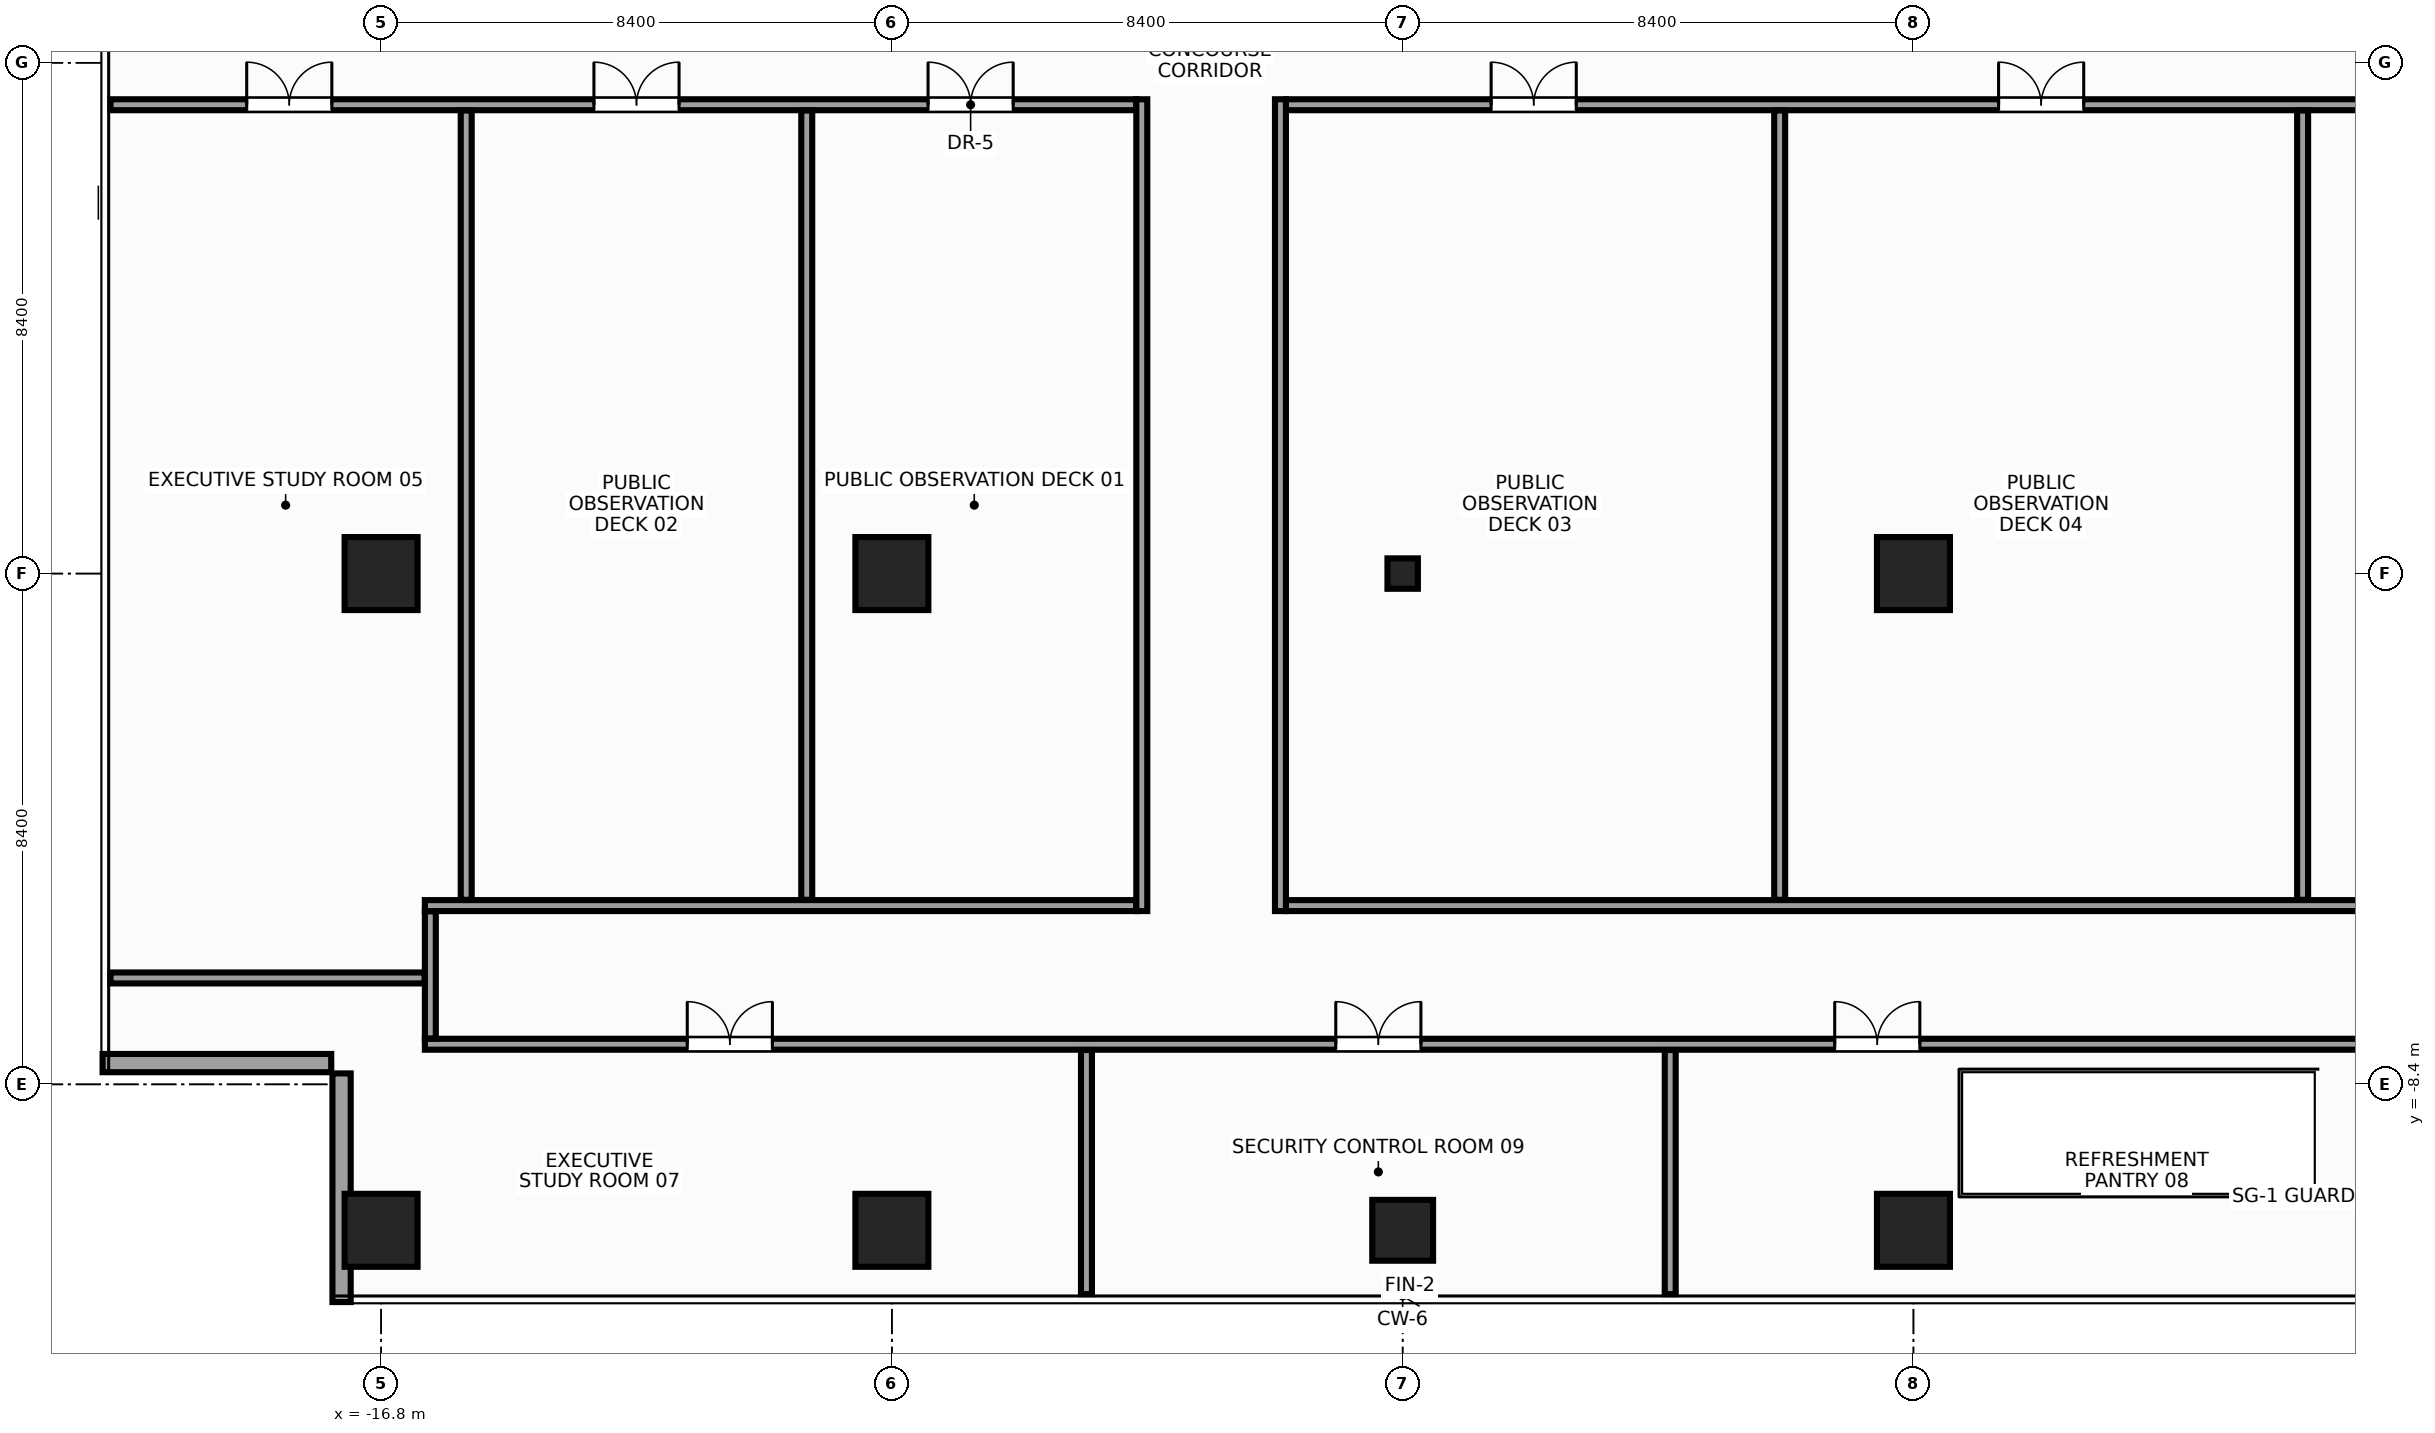
"""IFC4 building model, lengths in metres.
Left out: names, types, materials, properties, quantities, classifications, styles, units other than length and angle.
Written with IfcOpenShell. Run it as: python <this file> out.ifc"""

import sys

from ifc_helpers import new_model, si_unit, direction, frame, frame_2d, origin, origin_with_axes, origin_2d, place, context, subcontext, project, spatial, rectangle, hollow_rectangle, extrude, source, transform, mapped, element, fill, save


model = new_model("IFC4")
c1 = context("Model", 3, precision=1e-05, world=origin(), true_north=direction((0.0, 1.0)))
c2 = subcontext(c1, "Body", "Model", "MODEL_VIEW")
j1 = project(units=[si_unit("LENGTHUNIT", "METRE"), si_unit("PLANEANGLEUNIT", "RADIAN")], contexts=[c1])
p1 = place(None, origin())
s1 = spatial("IfcSite", under=j1, at=p1, CompositionType="ELEMENT")
p2 = place(p1, origin())
s2 = spatial("IfcBuilding", under=s1, at=p2, CompositionType="ELEMENT")
p3 = place(p2, frame((0.0, 0.0, 290.0)))
s3 = spatial("IfcBuildingStorey", under=s2, at=p3, CompositionType="ELEMENT", Elevation=290.0)
m1 = source(origin(), c2, "Body", "SweptSolid", [
    extrude(rectangle(XDim=1.2, YDim=1.2, at=origin_2d()), origin(), (0.0, 0.0, 1.0), 3.6),
])
for number, where, z_axis, x_axis in (
    (1, (-16.8, -10.8, 0.0), (0.0, 0.0, 1.0), (1.0, 0.0, 0.0)),
    (2, (-16.8, 0.0, 0.0), (0.0, 0.0, 1.0), (1.0, 0.0, 0.0)),
    (3, (-8.4, 0.0, 0.0), (0.0, 0.0, 1.0), (1.0, 0.0, 0.0)),
    (4, (-8.4, -10.8, 0.0), (0.0, 0.0, 1.0), (1.0, 0.0, 0.0)),
    (5, (8.4, 0.0, 0.0), (0.0, 0.0, 1.0), (1.0, 0.0, 0.0)),
    (6, (8.4, -10.8, 0.0), (0.0, 0.0, 1.0), (1.0, 0.0, 0.0)),
):
    element("IfcColumn", number, at=place(p3, frame(where, z_axis=z_axis, x_axis=x_axis)), inside=s3, PredefinedType="COLUMN", context=c2, shape_type="MappedRepresentation", body=[
        mapped(m1, transform((0.0, 0.0, 0.0), x_axis=(1.0, 0.0, 0.0), y_axis=(0.0, 1.0, 0.0), z_axis=(0.0, 0.0, 1.0), scale=1.0)),
    ])
m2 = source(origin(), c2, "Body", "SweptSolid", [
    extrude(rectangle(XDim=1.0, YDim=1.0, at=origin_2d()), origin(), (0.0, 0.0, 1.0), 3.6),
])
p4 = place(p3, frame((0.0, -10.8, 0.0), z_axis=(0.0, 0.0, 1.0), x_axis=(1.0, 0.0, 0.0)))
e7 = element("IfcColumn", 7, at=p4, inside=s3, PredefinedType="COLUMN", context=c2, shape_type="MappedRepresentation", body=[
    mapped(m2, transform((0.0, 0.0, 0.0), x_axis=(1.0, 0.0, 0.0), y_axis=(0.0, 1.0, 0.0), z_axis=(0.0, 0.0, 1.0), scale=1.0)),
])
m3 = source(origin(), c2, "Body", "SweptSolid", [
    extrude(hollow_rectangle(XDim=0.5, YDim=0.5, WallThickness=0.025, at=origin_2d()), origin(), (0.0, 0.0, 1.0), 3.6),
])
p5 = place(p3, origin_with_axes())
e8 = element("IfcColumn", 8, at=p5, inside=s3, PredefinedType="COLUMN", context=c2, shape_type="MappedRepresentation", body=[
    mapped(m3, transform((0.0, 0.0, 0.0), x_axis=(1.0, 0.0, 0.0), y_axis=(0.0, 1.0, 0.0), z_axis=(0.0, 0.0, 1.0), scale=1.0)),
])
m4 = source(origin(), c2, "Body", "SweptSolid", [
    extrude(rectangle(XDim=3.76, YDim=0.3, at=frame_2d((1.88, 0.0))), origin(), (0.0, 0.0, 1.0), 3.6),
])
p6 = place(p3, frame((-21.38, -8.05, 0.0), z_axis=(0.0, 0.0, 1.0), x_axis=(1.0, 0.0, 0.0)))
e9 = element("IfcWall", 9, at=p6, inside=s3, PredefinedType="STANDARD", context=c2, shape_type="MappedRepresentation", body=[
    mapped(m4, transform((0.0, 0.0, 0.0), x_axis=(1.0, 0.0, 0.0), y_axis=(0.0, 1.0, 0.0), z_axis=(0.0, 0.0, 1.0), scale=1.0)),
])
m5 = source(origin(), c2, "Body", "SweptSolid", [
    extrude(rectangle(XDim=3.76, YDim=0.3, at=frame_2d((1.88, 0.0))), origin(), (0.0, 0.0, 1.0), 3.6),
])
p7 = place(p3, frame((-17.45, -8.22, 0.0), z_axis=(0.0, 0.0, 1.0), x_axis=(0.0, -1.0, 0.0)))
e10 = element("IfcWall", 10, at=p7, inside=s3, PredefinedType="STANDARD", context=c2, shape_type="MappedRepresentation", body=[
    mapped(m5, transform((0.0, 0.0, 0.0), x_axis=(1.0, 0.0, 0.0), y_axis=(0.0, 1.0, 0.0), z_axis=(0.0, 0.0, 1.0), scale=1.0)),
])
m6 = source(origin(), c2, "Body", "SweptSolid", [
    extrude(rectangle(XDim=16.87, YDim=0.18, at=frame_2d((8.435, 0.0))), origin(), (0.0, 0.0, 1.0), 2.685),
])
p8 = place(p3, frame((-21.25, 7.71, 0.0), z_axis=(0.0, 0.0, 1.0), x_axis=(1.0, 0.0, 0.0)))
e11 = element("IfcWall", 11, at=p8, inside=s3, PredefinedType="PARTITIONING", context=c2, shape_type="MappedRepresentation", body=[
    mapped(m6, transform((0.0, 0.0, 0.0), x_axis=(1.0, 0.0, 0.0), y_axis=(0.0, 1.0, 0.0), z_axis=(0.0, 0.0, 1.0), scale=1.0)),
])
p9 = place(p8, frame((13.445, 0.0, 0.0)))
e12 = element("IfcOpeningElement", 12, at=p9, cuts=e11, PredefinedType="OPENING", context=c2, shape_type="SweptSolid", body=[
    extrude(rectangle(XDim=1.4, YDim=2.2, at=frame_2d((0.7, 1.1))), frame((0.0, 0.102, 0.0), z_axis=(0.0, -1.0, 0.0), x_axis=(1.0, 0.0, 0.0)), (0.0, 0.0, 1.0), 0.204),
])
p10 = place(p8, frame((7.95, 0.0, 0.0)))
e13 = element("IfcOpeningElement", 13, at=p10, cuts=e11, PredefinedType="OPENING", context=c2, shape_type="SweptSolid", body=[
    extrude(rectangle(XDim=1.4, YDim=2.2, at=frame_2d((0.7, 1.1))), frame((0.0, 0.102, 0.0), z_axis=(0.0, -1.0, 0.0), x_axis=(1.0, 0.0, 0.0)), (0.0, 0.0, 1.0), 0.204),
])
p11 = place(p8, frame((2.24, 0.0, 0.0)))
e14 = element("IfcOpeningElement", 14, at=p11, cuts=e11, PredefinedType="OPENING", context=c2, shape_type="SweptSolid", body=[
    extrude(rectangle(XDim=1.4, YDim=2.2, at=frame_2d((0.7, 1.1))), frame((0.0, 0.102, 0.0), z_axis=(0.0, -1.0, 0.0), x_axis=(1.0, 0.0, 0.0)), (0.0, 0.0, 1.0), 0.204),
])
m7 = source(origin(), c2, "Body", "SweptSolid", [
    extrude(rectangle(XDim=23.17, YDim=0.18, at=frame_2d((11.585, 0.0))), origin(), (0.0, 0.0, 1.0), 2.685),
])
p12 = place(p3, frame((-1.92, 7.71, 0.0), z_axis=(0.0, 0.0, 1.0), x_axis=(1.0, 0.0, 0.0)))
e15 = element("IfcWall", 15, at=p12, inside=s3, PredefinedType="PARTITIONING", context=c2, shape_type="MappedRepresentation", body=[
    mapped(m7, transform((0.0, 0.0, 0.0), x_axis=(1.0, 0.0, 0.0), y_axis=(0.0, 1.0, 0.0), z_axis=(0.0, 0.0, 1.0), scale=1.0)),
])
p13 = place(p12, frame((3.375, 0.0, 0.0)))
e16 = element("IfcOpeningElement", 16, at=p13, cuts=e15, PredefinedType="OPENING", context=c2, shape_type="SweptSolid", body=[
    extrude(rectangle(XDim=1.4, YDim=2.2, at=frame_2d((0.7, 1.1))), frame((0.0, 0.102, 0.0), z_axis=(0.0, -1.0, 0.0), x_axis=(1.0, 0.0, 0.0)), (0.0, 0.0, 1.0), 0.204),
])
p14 = place(p12, frame((11.72, 0.0, 0.0)))
e17 = element("IfcOpeningElement", 17, at=p14, cuts=e15, PredefinedType="OPENING", context=c2, shape_type="SweptSolid", body=[
    extrude(rectangle(XDim=1.4, YDim=2.2, at=frame_2d((0.7, 1.1))), frame((0.0, 0.102, 0.0), z_axis=(0.0, -1.0, 0.0), x_axis=(1.0, 0.0, 0.0)), (0.0, 0.0, 1.0), 0.204),
])
p15 = place(p12, frame((19.23, 0.0, 0.0)))
e18 = element("IfcOpeningElement", 18, at=p15, cuts=e15, PredefinedType="OPENING", context=c2, shape_type="SweptSolid", body=[
    extrude(rectangle(XDim=1.4, YDim=2.2, at=frame_2d((0.7, 1.1))), frame((0.0, 0.102, 0.0), z_axis=(0.0, -1.0, 0.0), x_axis=(1.0, 0.0, 0.0)), (0.0, 0.0, 1.0), 0.204),
])
m8 = source(origin(), c2, "Body", "SweptSolid", [
    extrude(rectangle(XDim=11.7, YDim=0.18, at=frame_2d((5.85, 0.0))), origin(), (0.0, 0.0, 1.0), 2.685),
])
p16 = place(p3, frame((-16.08, -5.46, 0.0), z_axis=(0.0, 0.0, 1.0), x_axis=(1.0, 0.0, 0.0)))
e19 = element("IfcWall", 19, at=p16, inside=s3, PredefinedType="PARTITIONING", context=c2, shape_type="MappedRepresentation", body=[
    mapped(m8, transform((0.0, 0.0, 0.0), x_axis=(1.0, 0.0, 0.0), y_axis=(0.0, 1.0, 0.0), z_axis=(0.0, 0.0, 1.0), scale=1.0)),
])
m9 = source(origin(), c2, "Body", "SweptSolid", [
    extrude(rectangle(XDim=18.0, YDim=0.18, at=frame_2d((9.0, 0.0))), origin(), (0.0, 0.0, 1.0), 2.685),
])
p17 = place(p3, frame((-1.92, -5.46, 0.0), z_axis=(0.0, 0.0, 1.0), x_axis=(1.0, 0.0, 0.0)))
e20 = element("IfcWall", 20, at=p17, inside=s3, PredefinedType="PARTITIONING", context=c2, shape_type="MappedRepresentation", body=[
    mapped(m9, transform((0.0, 0.0, 0.0), x_axis=(1.0, 0.0, 0.0), y_axis=(0.0, 1.0, 0.0), z_axis=(0.0, 0.0, 1.0), scale=1.0)),
])
m10 = source(origin(), c2, "Body", "SweptSolid", [
    extrude(rectangle(XDim=32.16, YDim=0.18, at=frame_2d((16.08, 0.0))), origin(), (0.0, 0.0, 1.0), 2.685),
])
p18 = place(p3, frame((-16.08, -7.74, 0.0), z_axis=(0.0, 0.0, 1.0), x_axis=(1.0, 0.0, 0.0)))
e21 = element("IfcWall", 21, at=p18, inside=s3, PredefinedType="PARTITIONING", context=c2, shape_type="MappedRepresentation", body=[
    mapped(m10, transform((0.0, 0.0, 0.0), x_axis=(1.0, 0.0, 0.0), y_axis=(0.0, 1.0, 0.0), z_axis=(0.0, 0.0, 1.0), scale=1.0)),
])
p19 = place(p18, frame((4.315, 0.0, 0.0)))
e22 = element("IfcOpeningElement", 22, at=p19, cuts=e21, PredefinedType="OPENING", context=c2, shape_type="SweptSolid", body=[
    extrude(rectangle(XDim=1.4, YDim=2.2, at=frame_2d((0.7, 1.1))), frame((0.0, 0.102, 0.0), z_axis=(0.0, -1.0, 0.0), x_axis=(1.0, 0.0, 0.0)), (0.0, 0.0, 1.0), 0.204),
])
p20 = place(p18, frame((23.185, 0.0, 0.0)))
e23 = element("IfcOpeningElement", 23, at=p20, cuts=e21, PredefinedType="OPENING", context=c2, shape_type="SweptSolid", body=[
    extrude(rectangle(XDim=1.4, YDim=2.2, at=frame_2d((0.7, 1.1))), frame((0.0, 0.102, 0.0), z_axis=(0.0, -1.0, 0.0), x_axis=(1.0, 0.0, 0.0)), (0.0, 0.0, 1.0), 0.204),
])
p21 = place(p18, frame((14.98, 0.0, 0.0)))
e24 = element("IfcOpeningElement", 24, at=p21, cuts=e21, PredefinedType="OPENING", context=c2, shape_type="SweptSolid", body=[
    extrude(rectangle(XDim=1.4, YDim=2.2, at=frame_2d((0.7, 1.1))), frame((0.0, 0.102, 0.0), z_axis=(0.0, -1.0, 0.0), x_axis=(1.0, 0.0, 0.0)), (0.0, 0.0, 1.0), 0.204),
])
m11 = source(origin(), c2, "Body", "SweptSolid", [
    extrude(rectangle(XDim=13.35, YDim=0.18, at=frame_2d((6.675, 0.0))), origin(), (0.0, 0.0, 1.0), 2.585),
])
for number, where, z_axis, x_axis in (
    (25, (-4.29, -5.55, 0.0), (0.0, 0.0, 1.0), (0.0, 1.0, 0.0)),
    (26, (-2.01, -5.55, 0.0), (0.0, 0.0, 1.0), (0.0, 1.0, 0.0)),
):
    element("IfcWall", number, at=place(p3, frame(where, z_axis=z_axis, x_axis=x_axis)), inside=s3, PredefinedType="PARTITIONING", context=c2, shape_type="MappedRepresentation", body=[
        mapped(m11, transform((0.0, 0.0, 0.0), x_axis=(1.0, 0.0, 0.0), y_axis=(0.0, 1.0, 0.0), z_axis=(0.0, 0.0, 1.0), scale=1.0)),
    ])
m12 = source(origin(), c2, "Body", "SweptSolid", [
    extrude(rectangle(XDim=2.09, YDim=0.18, at=frame_2d((1.045, 0.0))), origin(), (0.0, 0.0, 1.0), 3.3),
])
p22 = place(p3, frame((-15.99, -7.645, 0.0), z_axis=(0.0, 0.0, 1.0), x_axis=(0.0, 1.0, 0.0)))
e27 = element("IfcWall", 27, at=p22, inside=s3, PredefinedType="PARTITIONING", context=c2, shape_type="MappedRepresentation", body=[
    mapped(m12, transform((0.0, 0.0, 0.0), x_axis=(1.0, 0.0, 0.0), y_axis=(0.0, 1.0, 0.0), z_axis=(0.0, 0.0, 1.0), scale=1.0)),
])
m13 = source(origin(), c2, "Body", "SweptSolid", [
    extrude(rectangle(XDim=5.165, YDim=0.18, at=frame_2d((2.583, 0.0))), origin(), (0.0, 0.0, 1.0), 2.685),
])
p23 = place(p3, frame((-21.25, -6.65, 0.0), z_axis=(0.0, 0.0, 1.0), x_axis=(1.0, 0.0, 0.0)))
e28 = element("IfcWall", 28, at=p23, inside=s3, PredefinedType="PARTITIONING", context=c2, shape_type="MappedRepresentation", body=[
    mapped(m13, transform((0.0, 0.0, 0.0), x_axis=(1.0, 0.0, 0.0), y_axis=(0.0, 1.0, 0.0), z_axis=(0.0, 0.0, 1.0), scale=1.0)),
])
m14 = source(origin(), c2, "Body", "SweptSolid", [
    extrude(rectangle(XDim=12.98, YDim=0.18, at=frame_2d((6.49, 0.0))), origin(), (0.0, 0.0, 1.0), 2.585),
])
for number, where, z_axis, x_axis in (
    (29, (-15.4, -5.365, 0.0), (0.0, 0.0, 1.0), (0.0, 1.0, 0.0)),
    (30, (-9.8, -5.365, 0.0), (0.0, 0.0, 1.0), (0.0, 1.0, 0.0)),
    (31, (6.2, -5.365, 0.0), (0.0, 0.0, 1.0), (0.0, 1.0, 0.0)),
    (32, (14.8, -5.365, 0.0), (0.0, 0.0, 1.0), (0.0, 1.0, 0.0)),
):
    element("IfcWall", number, at=place(p3, frame(where, z_axis=z_axis, x_axis=x_axis)), inside=s3, PredefinedType="PARTITIONING", context=c2, shape_type="MappedRepresentation", body=[
        mapped(m14, transform((0.0, 0.0, 0.0), x_axis=(1.0, 0.0, 0.0), y_axis=(0.0, 1.0, 0.0), z_axis=(0.0, 0.0, 1.0), scale=1.0)),
    ])
m15 = source(origin(), c2, "Body", "SweptSolid", [
    extrude(rectangle(XDim=4.015, YDim=0.18, at=frame_2d((2.008, 0.0))), origin(), (0.0, 0.0, 1.0), 2.835),
])
p24 = place(p3, frame((-5.2, -11.85, 0.0), z_axis=(0.0, 0.0, 1.0), x_axis=(0.0, 1.0, 0.0)))
e33 = element("IfcWall", 33, at=p24, inside=s3, PredefinedType="PARTITIONING", context=c2, shape_type="MappedRepresentation", body=[
    mapped(m15, transform((0.0, 0.0, 0.0), x_axis=(1.0, 0.0, 0.0), y_axis=(0.0, 1.0, 0.0), z_axis=(0.0, 0.0, 1.0), scale=1.0)),
])
m16 = source(origin(), c2, "Body", "SweptSolid", [
    extrude(rectangle(XDim=4.015, YDim=0.18, at=frame_2d((2.008, 0.0))), origin(), (0.0, 0.0, 1.0), 2.785),
])
p25 = place(p3, frame((4.4, -11.85, 0.0), z_axis=(0.0, 0.0, 1.0), x_axis=(0.0, 1.0, 0.0)))
e34 = element("IfcWall", 34, at=p25, inside=s3, PredefinedType="PARTITIONING", context=c2, shape_type="MappedRepresentation", body=[
    mapped(m16, transform((0.0, 0.0, 0.0), x_axis=(1.0, 0.0, 0.0), y_axis=(0.0, 1.0, 0.0), z_axis=(0.0, 0.0, 1.0), scale=1.0)),
])
m17 = source(origin(), c2, "Body", "SweptSolid", [
    extrude(rectangle(XDim=1.4, YDim=2.2, at=frame_2d((0.7, 1.1))), frame((0.0, 0.025, 0.0), z_axis=(0.0, -1.0, 0.0), x_axis=(1.0, 0.0, 0.0)), (0.0, 0.0, 1.0), 0.05),
])
p26 = place(p9, origin())
e35 = element("IfcDoor", 35, at=p26, inside=s3, OperationType="DOUBLE_DOOR_SINGLE_SWING", PredefinedType="DOOR", context=c2, shape_type="MappedRepresentation", body=[
    mapped(m17, transform((0.0, 0.0, 0.0), x_axis=(1.0, 0.0, 0.0), y_axis=(0.0, 1.0, 0.0), z_axis=(0.0, 0.0, 1.0), scale=1.0)),
])
fill(e12, e35)
p27 = place(p10, origin())
e36 = element("IfcDoor", 36, at=p27, inside=s3, OperationType="DOUBLE_DOOR_SINGLE_SWING", PredefinedType="DOOR", context=c2, shape_type="MappedRepresentation", body=[
    mapped(m17, transform((0.0, 0.0, 0.0), x_axis=(1.0, 0.0, 0.0), y_axis=(0.0, 1.0, 0.0), z_axis=(0.0, 0.0, 1.0), scale=1.0)),
])
fill(e13, e36)
p28 = place(p13, origin())
e37 = element("IfcDoor", 37, at=p28, inside=s3, OperationType="DOUBLE_DOOR_SINGLE_SWING", PredefinedType="DOOR", context=c2, shape_type="MappedRepresentation", body=[
    mapped(m17, transform((0.0, 0.0, 0.0), x_axis=(1.0, 0.0, 0.0), y_axis=(0.0, 1.0, 0.0), z_axis=(0.0, 0.0, 1.0), scale=1.0)),
])
fill(e16, e37)
p29 = place(p14, origin())
e38 = element("IfcDoor", 38, at=p29, inside=s3, OperationType="DOUBLE_DOOR_SINGLE_SWING", PredefinedType="DOOR", context=c2, shape_type="MappedRepresentation", body=[
    mapped(m17, transform((0.0, 0.0, 0.0), x_axis=(1.0, 0.0, 0.0), y_axis=(0.0, 1.0, 0.0), z_axis=(0.0, 0.0, 1.0), scale=1.0)),
])
fill(e17, e38)
p30 = place(p11, origin())
e39 = element("IfcDoor", 39, at=p30, inside=s3, OperationType="DOUBLE_DOOR_SINGLE_SWING", PredefinedType="DOOR", context=c2, shape_type="MappedRepresentation", body=[
    mapped(m17, transform((0.0, 0.0, 0.0), x_axis=(1.0, 0.0, 0.0), y_axis=(0.0, 1.0, 0.0), z_axis=(0.0, 0.0, 1.0), scale=1.0)),
])
fill(e14, e39)
p31 = place(p19, origin())
e40 = element("IfcDoor", 40, at=p31, inside=s3, OperationType="DOUBLE_DOOR_SINGLE_SWING", PredefinedType="DOOR", context=c2, shape_type="MappedRepresentation", body=[
    mapped(m17, transform((0.0, 0.0, 0.0), x_axis=(1.0, 0.0, 0.0), y_axis=(0.0, 1.0, 0.0), z_axis=(0.0, 0.0, 1.0), scale=1.0)),
])
fill(e22, e40)
p32 = place(p20, origin())
e41 = element("IfcDoor", 41, at=p32, inside=s3, OperationType="DOUBLE_DOOR_SINGLE_SWING", PredefinedType="DOOR", context=c2, shape_type="MappedRepresentation", body=[
    mapped(m17, transform((0.0, 0.0, 0.0), x_axis=(1.0, 0.0, 0.0), y_axis=(0.0, 1.0, 0.0), z_axis=(0.0, 0.0, 1.0), scale=1.0)),
])
fill(e23, e41)
p33 = place(p21, origin())
e42 = element("IfcDoor", 42, at=p33, inside=s3, OperationType="DOUBLE_DOOR_SINGLE_SWING", PredefinedType="DOOR", context=c2, shape_type="MappedRepresentation", body=[
    mapped(m17, transform((0.0, 0.0, 0.0), x_axis=(1.0, 0.0, 0.0), y_axis=(0.0, 1.0, 0.0), z_axis=(0.0, 0.0, 1.0), scale=1.0)),
])
fill(e24, e42)
save(model, sys.argv[1])
